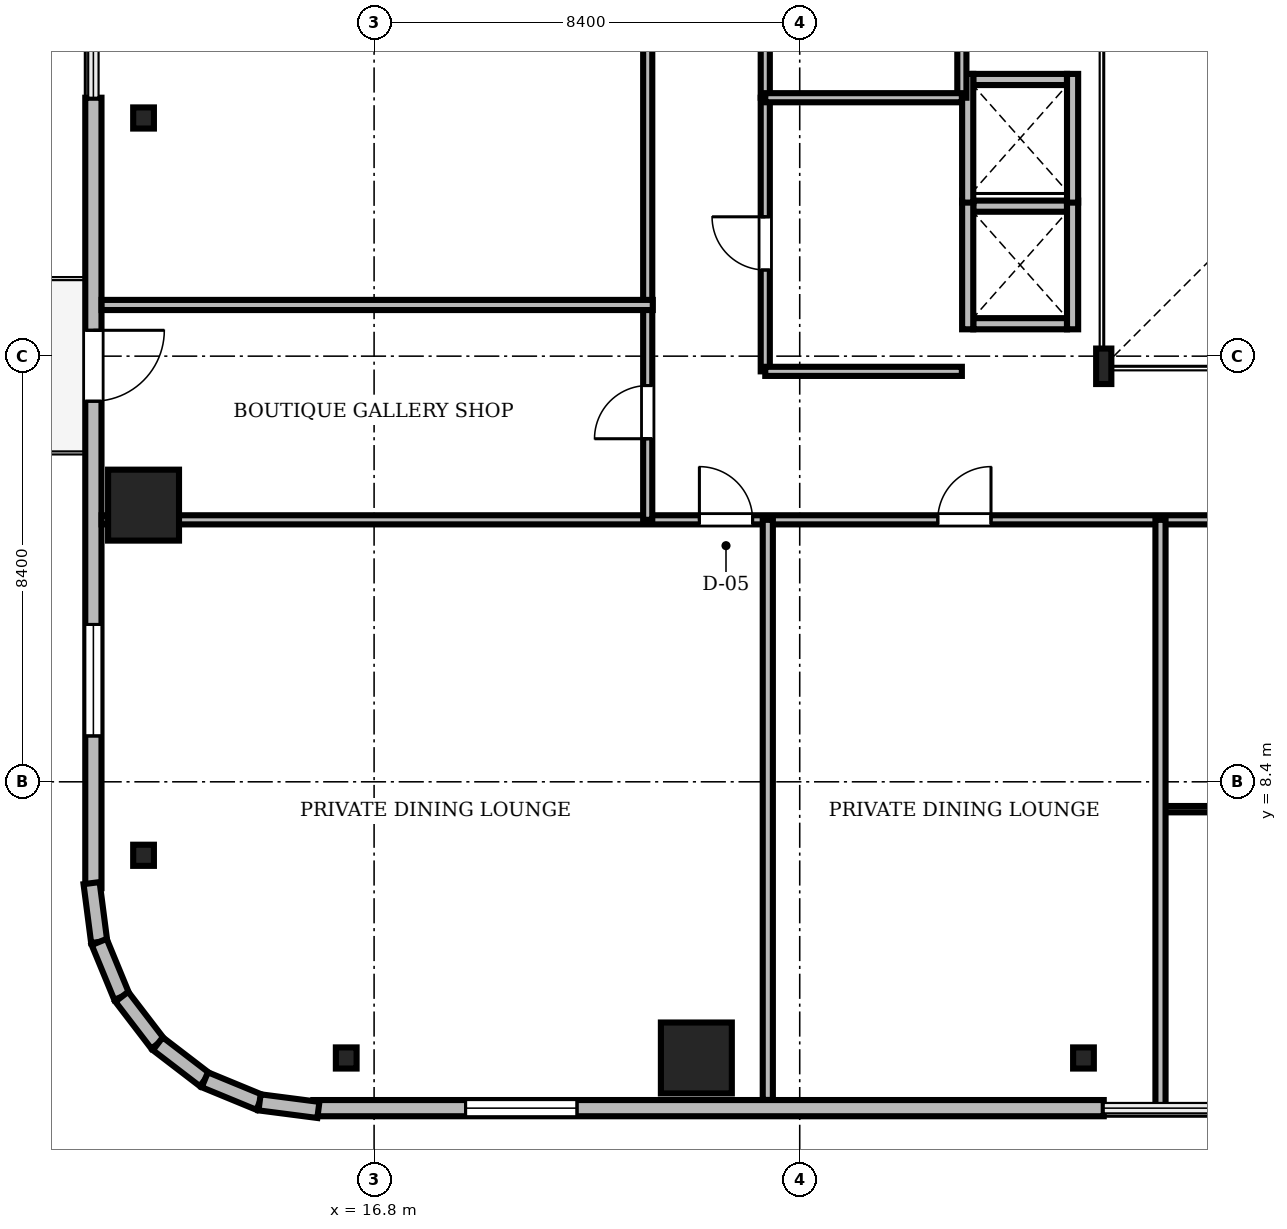
"""IFC4 building model, lengths in metres.
Left out: names, types, materials, properties, quantities, classifications, styles, units other than length and angle.
Written with IfcOpenShell. Run it as: python <this file> out.ifc"""

import sys

from ifc_helpers import new_model, si_unit, direction, frame, frame_2d, origin, origin_2d, place, context, subcontext, project, spatial, rectangle, i_section, extrude, source, transform, mapped, element, fill, save


model = new_model("IFC4")
c1 = context("Model", 3, precision=1e-05, world=origin(), true_north=direction((0.0, 1.0)))
c2 = subcontext(c1, "Body", "Model", "MODEL_VIEW")
j1 = project(units=[si_unit("LENGTHUNIT", "METRE"), si_unit("PLANEANGLEUNIT", "RADIAN")], contexts=[c1])
p1 = place(None, origin())
s1 = spatial("IfcSite", under=j1, at=p1, CompositionType="ELEMENT")
p2 = place(p1, origin())
s2 = spatial("IfcBuilding", under=s1, at=p2, CompositionType="ELEMENT")
p3 = place(p2, frame((0.0, 0.0, 192.3)))
s3 = spatial("IfcBuildingStorey", under=s2, at=p3, CompositionType="ELEMENT", Elevation=192.3)
m1 = source(origin(), c2, "Body", "SweptSolid", [
    extrude(i_section(OverallWidth=0.3, OverallDepth=0.7, WebThickness=0.017, FlangeThickness=0.032, FilletRadius=0.027, at=origin_2d()), origin(), (0.0, 0.0, 1.0), 3.53),
])
p4 = place(p3, frame((31.2, 16.6, 0.0), z_axis=(0.0, 0.0, 1.0), x_axis=(1.0, 0.0, 0.0)))
e1 = element("IfcColumn", 1, at=p4, inside=s3, PredefinedType="COLUMN", context=c2, shape_type="MappedRepresentation", body=[
    mapped(m1, transform((0.0, 0.0, 0.0), scale=1.0)),
])
m2 = source(origin(), c2, "Body", "SweptSolid", [
    extrude(rectangle(XDim=1.4, YDim=1.4, at=origin_2d()), origin(), (0.0, 0.0, 1.0), 3.53),
])
for number, where, z_axis, x_axis in (
    (2, (23.16, 2.95, 0.0), (0.0, 0.0, 1.0), (1.0, 0.0, 0.0)),
    (3, (12.25, 13.86, 0.0), (0.0, 0.0, 1.0), (1.0, 0.0, 0.0)),
):
    element("IfcColumn", number, at=place(p3, frame(where, z_axis=z_axis, x_axis=x_axis)), inside=s3, PredefinedType="COLUMN", context=c2, shape_type="MappedRepresentation", body=[
        mapped(m2, transform((0.0, 0.0, 0.0), scale=1.0)),
    ])
m3 = source(origin(), c2, "Body", "SweptSolid", [
    extrude(i_section(OverallWidth=0.409, OverallDepth=0.417, WebThickness=0.021, FlangeThickness=0.033, FilletRadius=0.015, at=origin_2d()), origin(), (0.0, 0.0, 1.0), 3.53),
])
for number, where, z_axis, x_axis in (
    (4, (16.25, 2.95, 0.0), (0.0, 0.0, 1.0), (1.0, 0.0, 0.0)),
    (5, (30.8, 2.95, 0.0), (0.0, 0.0, 1.0), (1.0, 0.0, 0.0)),
    (6, (12.25, 21.5, 0.0), (0.0, 0.0, 1.0), (1.0, 0.0, 0.0)),
    (7, (12.25, 6.95, 0.0), (0.0, 0.0, 1.0), (1.0, 0.0, 0.0)),
):
    element("IfcColumn", number, at=place(p3, frame(where, z_axis=z_axis, x_axis=x_axis)), inside=s3, PredefinedType="COLUMN", context=c2, shape_type="MappedRepresentation", body=[
        mapped(m3, transform((0.0, 0.0, 0.0), scale=1.0)),
    ])
m4 = source(origin(), c2, "Body", "SweptSolid", [
    extrude(rectangle(XDim=15.6, YDim=0.32, at=frame_2d((7.8, 0.0))), origin(), (0.0, 0.0, 1.0), 3.53),
])
p5 = place(p3, frame((15.6, 1.96, 0.0), z_axis=(0.0, 0.0, 1.0), x_axis=(1.0, 0.0, 0.0)))
e8 = element("IfcWall", 8, at=p5, inside=s3, PredefinedType="SOLIDWALL", context=c2, shape_type="MappedRepresentation", body=[
    mapped(m4, transform((0.0, 0.0, 0.0), scale=1.0)),
])
m5 = source(origin(), c2, "Body", "SweptSolid", [
    extrude(rectangle(XDim=2.2, YDim=2.4, at=frame_2d((1.1, 1.2))), frame((0.0, 0.17, 0.0), z_axis=(0.0, -1.0, 0.0), x_axis=(1.0, 0.0, 0.0)), (0.0, 0.0, 1.0), 0.34),
])
p6 = place(p5, frame((3.005, 0.0, 0.72)))
e9 = element("IfcOpeningElement", 9, at=p6, cuts=e8, PredefinedType="OPENING", context=c2, shape_type="MappedRepresentation", body=[
    mapped(m5, transform((0.0, 0.0, 0.0), scale=1.0)),
])
p7 = place(p3, frame((11.26, 21.9, 0.0), z_axis=(0.0, 0.0, 1.0), x_axis=(0.0, -1.0, 0.0)))
e10 = element("IfcWall", 10, at=p7, inside=s3, PredefinedType="SOLIDWALL", context=c2, shape_type="MappedRepresentation", body=[
    mapped(m4, transform((0.0, 0.0, 0.0), scale=1.0)),
])
m6 = source(origin(), c2, "Body", "SweptSolid", [
    extrude(rectangle(XDim=1.4, YDim=2.3, at=frame_2d((0.7, 1.15))), frame((0.0, 0.17, 0.0), z_axis=(0.0, -1.0, 0.0), x_axis=(1.0, 0.0, 0.0)), (0.0, 0.0, 1.0), 0.34),
])
p8 = place(p7, frame((4.59, 0.0, 0.0)))
e11 = element("IfcOpeningElement", 11, at=p8, cuts=e10, PredefinedType="OPENING", context=c2, shape_type="MappedRepresentation", body=[
    mapped(m6, transform((0.0, 0.0, 0.0), scale=1.0)),
])
p9 = place(p7, frame((10.395, 0.0, 0.72)))
e12 = element("IfcOpeningElement", 12, at=p9, cuts=e10, PredefinedType="OPENING", context=c2, shape_type="MappedRepresentation", body=[
    mapped(m5, transform((0.0, 0.0, 0.0), scale=1.0)),
])
m7 = source(origin(), c2, "Body", "SweptSolid", [
    extrude(rectangle(XDim=1.171, YDim=0.32, at=frame_2d((0.585, 0.0))), origin(), (0.0, 0.0, 1.0), 3.53),
])
p10 = place(p3, frame((11.224, 6.401, 0.0), z_axis=(0.0, 0.0, 1.0), x_axis=(0.128269133229, -0.991739395941, 0.0)))
e13 = element("IfcWall", 13, at=p10, inside=s3, PredefinedType="SOLIDWALL", context=c2, shape_type="MappedRepresentation", body=[
    mapped(m7, transform((0.0, 0.0, 0.0), scale=1.0)),
])
m8 = source(origin(), c2, "Body", "SweptSolid", [
    extrude(rectangle(XDim=1.169, YDim=0.32, at=frame_2d((0.584, 0.0))), origin(), (0.0, 0.0, 1.0), 3.53),
])
for number, where, z_axis, x_axis in (
    (14, (11.375, 5.24, 0.0), (0.0, 0.0, 1.0), (0.381, -0.925, 0.0)),
    (15, (11.82, 4.159, 0.0), (0.0, 0.0, 1.0), (0.608, -0.794, 0.0)),
):
    element("IfcWall", number, at=place(p3, frame(where, z_axis=z_axis, x_axis=x_axis)), inside=s3, PredefinedType="SOLIDWALL", context=c2, shape_type="MappedRepresentation", body=[
        mapped(m8, transform((0.0, 0.0, 0.0), scale=1.0)),
    ])
m9 = source(origin(), c2, "Body", "SweptSolid", [
    extrude(rectangle(XDim=1.169, YDim=0.32, at=frame_2d((0.584, 0.0))), origin(), (0.0, 0.0, 1.0), 3.53),
])
p11 = place(p3, frame((12.531, 3.231, 0.0), z_axis=(0.0, 0.0, 1.0), x_axis=(0.793663520347, -0.608356981114, 0.0)))
e16 = element("IfcWall", 16, at=p11, inside=s3, PredefinedType="SOLIDWALL", context=c2, shape_type="MappedRepresentation", body=[
    mapped(m9, transform((0.0, 0.0, 0.0), scale=1.0)),
])
m10 = source(origin(), c2, "Body", "SweptSolid", [
    extrude(rectangle(XDim=1.169, YDim=0.32, at=frame_2d((0.585, 0.0))), origin(), (0.0, 0.0, 1.0), 3.53),
])
p12 = place(p3, frame((13.459, 2.52, 0.0), z_axis=(0.0, 0.0, 1.0), x_axis=(0.924479075121, -0.381232789334, 0.0)))
e17 = element("IfcWall", 17, at=p12, inside=s3, PredefinedType="SOLIDWALL", context=c2, shape_type="MappedRepresentation", body=[
    mapped(m10, transform((0.0, 0.0, 0.0), scale=1.0)),
])
m11 = source(origin(), c2, "Body", "SweptSolid", [
    extrude(rectangle(XDim=1.17, YDim=0.32, at=frame_2d((0.585, 0.0))), origin(), (0.0, 0.0, 1.0), 3.53),
])
p13 = place(p3, frame((14.54, 2.074, 0.0), z_axis=(0.0, 0.0, 1.0), x_axis=(0.991762485493, -0.128090485085, 0.0)))
e18 = element("IfcWall", 18, at=p13, inside=s3, PredefinedType="SOLIDWALL", context=c2, shape_type="MappedRepresentation", body=[
    mapped(m11, transform((0.0, 0.0, 0.0), scale=1.0)),
])
m12 = source(origin(), c2, "Body", "SweptSolid", [
    extrude(rectangle(XDim=1.85, YDim=0.22, at=frame_2d((0.925, 0.0))), origin(), (0.0, 0.0, 1.0), 2.972),
])
p14 = place(p3, frame((28.625, 17.44, 0.0), z_axis=(0.0, 0.0, 1.0), x_axis=(1.0, 0.0, 0.0)))
e19 = element("IfcWall", 19, at=p14, inside=s3, PredefinedType="SOLIDWALL", context=c2, shape_type="MappedRepresentation", body=[
    mapped(m12, transform((0.0, 0.0, 0.0), scale=1.0)),
])
m13 = source(origin(), c2, "Body", "SweptSolid", [
    extrude(rectangle(XDim=1.85, YDim=0.22, at=frame_2d((0.925, 0.0))), origin(), (0.0, 0.0, 1.0), 3.53),
])
p15 = place(p3, frame((28.625, 19.76, 0.0), z_axis=(0.0, 0.0, 1.0), x_axis=(1.0, 0.0, 0.0)))
e20 = element("IfcWall", 20, at=p15, inside=s3, PredefinedType="SOLIDWALL", context=c2, shape_type="MappedRepresentation", body=[
    mapped(m13, transform((0.0, 0.0, 0.0), scale=1.0)),
])
m14 = source(origin(), c2, "Body", "SweptSolid", [
    extrude(rectangle(XDim=2.54, YDim=0.22, at=frame_2d((1.27, 0.0))), origin(), (0.0, 0.0, 1.0), 2.972),
])
p16 = place(p3, frame((28.515, 17.33, 0.0), z_axis=(0.0, 0.0, 1.0), x_axis=(0.0, 1.0, 0.0)))
e21 = element("IfcWall", 21, at=p16, inside=s3, PredefinedType="SOLIDWALL", context=c2, shape_type="MappedRepresentation", body=[
    mapped(m14, transform((0.0, 0.0, 0.0), scale=1.0)),
])
m15 = source(origin(), c2, "Body", "SweptSolid", [
    extrude(rectangle(XDim=2.54, YDim=0.22, at=frame_2d((1.27, 0.0))), origin(), (0.0, 0.0, 1.0), 3.53),
])
p17 = place(p3, frame((30.585, 17.33, 0.0), z_axis=(0.0, 0.0, 1.0), x_axis=(0.0, 1.0, 0.0)))
e22 = element("IfcWall", 22, at=p17, inside=s3, PredefinedType="SOLIDWALL", context=c2, shape_type="MappedRepresentation", body=[
    mapped(m15, transform((0.0, 0.0, 0.0), scale=1.0)),
])
p18 = place(p3, frame((28.625, 22.26, 0.0), z_axis=(0.0, 0.0, 1.0), x_axis=(1.0, 0.0, 0.0)))
e23 = element("IfcWall", 23, at=p18, inside=s3, PredefinedType="SOLIDWALL", context=c2, shape_type="MappedRepresentation", body=[
    mapped(m13, transform((0.0, 0.0, 0.0), scale=1.0)),
])
for number, where, z_axis, x_axis in (
    (24, (28.515, 19.83, 0.0), (0.0, 0.0, 1.0), (0.0, 1.0, 0.0)),
    (25, (30.585, 19.83, 0.0), (0.0, 0.0, 1.0), (0.0, 1.0, 0.0)),
):
    element("IfcWall", number, at=place(p3, frame(where, z_axis=z_axis, x_axis=x_axis)), inside=s3, PredefinedType="SOLIDWALL", context=c2, shape_type="MappedRepresentation", body=[
        mapped(m15, transform((0.0, 0.0, 0.0), scale=1.0)),
    ])
m16 = source(origin(), c2, "Body", "SweptSolid", [
    extrude(rectangle(XDim=46.156, YDim=0.18, at=frame_2d((23.078, 0.0))), origin(), (0.0, 0.0, 1.0), 2.772),
])
p19 = place(p3, frame((11.422, 13.57, 0.0), z_axis=(0.0, 0.0, 1.0), x_axis=(1.0, 0.0, 0.0)))
e26 = element("IfcWall", 26, at=p19, inside=s3, PredefinedType="PARTITIONING", context=c2, shape_type="MappedRepresentation", body=[
    mapped(m16, transform((0.0, 0.0, 0.0), scale=1.0)),
])
m17 = source(origin(), c2, "Body", "SweptSolid", [
    extrude(rectangle(XDim=1.05, YDim=2.2, at=frame_2d((0.525, 1.1))), frame((0.0, 0.1, 0.0), z_axis=(0.0, -1.0, 0.0), x_axis=(1.0, 0.0, 0.0)), (0.0, 0.0, 1.0), 0.2),
])
p20 = place(p19, frame((11.798, 0.0, 0.0)))
e27 = element("IfcOpeningElement", 27, at=p20, cuts=e26, PredefinedType="OPENING", context=c2, shape_type="MappedRepresentation", body=[
    mapped(m17, transform((0.0, 0.0, 0.0), scale=1.0)),
])
p21 = place(p19, frame((16.503, 0.0, 0.0)))
e28 = element("IfcOpeningElement", 28, at=p21, cuts=e26, PredefinedType="OPENING", context=c2, shape_type="MappedRepresentation", body=[
    mapped(m17, transform((0.0, 0.0, 0.0), scale=1.0)),
])
p22 = place(p19, frame((24.253, 0.0, 0.0)))
e29 = element("IfcOpeningElement", 29, at=p22, cuts=e26, PredefinedType="OPENING", context=c2, shape_type="MappedRepresentation", body=[
    mapped(m17, transform((0.0, 0.0, 0.0), scale=1.0)),
])
p23 = place(p19, frame((32.003, 0.0, 0.0)))
e30 = element("IfcOpeningElement", 30, at=p23, cuts=e26, PredefinedType="OPENING", context=c2, shape_type="MappedRepresentation", body=[
    mapped(m17, transform((0.0, 0.0, 0.0), scale=1.0)),
])
p24 = place(p19, frame((37.498, 0.0, 0.0)))
e31 = element("IfcOpeningElement", 31, at=p24, cuts=e26, PredefinedType="OPENING", context=c2, shape_type="MappedRepresentation", body=[
    mapped(m17, transform((0.0, 0.0, 0.0), scale=1.0)),
])
m18 = source(origin(), c2, "Body", "SweptSolid", [
    extrude(rectangle(XDim=14.98, YDim=0.18, at=frame_2d((7.49, 0.0))), origin(), (0.0, 0.0, 1.0), 2.972),
])
p25 = place(p3, frame((22.2, 13.57, 0.0), z_axis=(0.0, 0.0, 1.0), x_axis=(0.0, 1.0, 0.0)))
e32 = element("IfcWall", 32, at=p25, inside=s3, PredefinedType="PARTITIONING", context=c2, shape_type="MappedRepresentation", body=[
    mapped(m18, transform((0.0, 0.0, 0.0), scale=1.0)),
])
p26 = place(p25, frame((1.6, 0.0, 0.0)))
e33 = element("IfcOpeningElement", 33, at=p26, cuts=e32, PredefinedType="OPENING", context=c2, shape_type="MappedRepresentation", body=[
    mapped(m17, transform((0.0, 0.0, 0.0), scale=1.0)),
])
m19 = source(origin(), c2, "Body", "SweptSolid", [
    extrude(rectangle(XDim=7.75, YDim=0.125, at=frame_2d((3.875, 0.0))), origin(), (0.0, 0.0, 1.0), 2.972),
])
p27 = place(p3, frame((32.32, 7.86, 0.0), z_axis=(0.0, 0.0, 1.0), x_axis=(1.0, 0.0, 0.0)))
e34 = element("IfcWall", 34, at=p27, inside=s3, PredefinedType="PARTITIONING", context=c2, shape_type="MappedRepresentation", body=[
    mapped(m19, transform((0.0, 0.0, 0.0), scale=1.0)),
])
m20 = source(origin(), c2, "Body", "SweptSolid", [
    extrude(rectangle(XDim=0.95, YDim=2.15, at=frame_2d((0.475, 1.075))), frame((0.0, 0.073, 0.0), z_axis=(0.0, -1.0, 0.0), x_axis=(1.0, 0.0, 0.0)), (0.0, 0.0, 1.0), 0.145),
])
p28 = place(p27, frame((3.395, 0.0, 0.0)))
e35 = element("IfcOpeningElement", 35, at=p28, cuts=e34, PredefinedType="OPENING", context=c2, shape_type="MappedRepresentation", body=[
    mapped(m20, transform((0.0, 0.0, 0.0), scale=1.0)),
])
m21 = source(origin(), c2, "Body", "SweptSolid", [
    extrude(rectangle(XDim=6.54, YDim=0.18, at=frame_2d((3.27, 0.0))), origin(), (0.0, 0.0, 1.0), 2.972),
])
p29 = place(p3, frame((24.52, 21.9, 0.0), z_axis=(0.0, 0.0, 1.0), x_axis=(0.0, 1.0, 0.0)))
e36 = element("IfcWall", 36, at=p29, inside=s3, PredefinedType="PARTITIONING", context=c2, shape_type="MappedRepresentation", body=[
    mapped(m21, transform((0.0, 0.0, 0.0), scale=1.0)),
])
p30 = place(p29, frame((2.2, 0.0, 0.0)))
e37 = element("IfcOpeningElement", 37, at=p30, cuts=e36, PredefinedType="OPENING", context=c2, shape_type="MappedRepresentation", body=[
    mapped(m17, transform((0.0, 0.0, 0.0), scale=1.0)),
])
m22 = source(origin(), c2, "Body", "SweptSolid", [
    extrude(rectangle(XDim=5.4, YDim=0.18, at=frame_2d((2.7, 0.0))), origin(), (0.0, 0.0, 1.0), 2.972),
])
p31 = place(p3, frame((24.52, 16.5, 0.0), z_axis=(0.0, 0.0, 1.0), x_axis=(0.0, 1.0, 0.0)))
e38 = element("IfcWall", 38, at=p31, inside=s3, PredefinedType="PARTITIONING", context=c2, shape_type="MappedRepresentation", body=[
    mapped(m22, transform((0.0, 0.0, 0.0), scale=1.0)),
])
p32 = place(p31, frame((2.0, 0.0, 0.0)))
e39 = element("IfcOpeningElement", 39, at=p32, cuts=e38, PredefinedType="OPENING", context=c2, shape_type="MappedRepresentation", body=[
    mapped(m17, transform((0.0, 0.0, 0.0), scale=1.0)),
])
m23 = source(origin(), c2, "Body", "SweptSolid", [
    extrude(rectangle(XDim=11.448, YDim=0.2, at=frame_2d((5.724, 0.0))), origin(), (0.0, 0.0, 1.0), 2.772),
])
p33 = place(p3, frame((24.57, 2.122, 0.0), z_axis=(0.0, 0.0, 1.0), x_axis=(0.0, 1.0, 0.0)))
e40 = element("IfcWall", 40, at=p33, inside=s3, PredefinedType="PARTITIONING", context=c2, shape_type="MappedRepresentation", body=[
    mapped(m23, transform((0.0, 0.0, 0.0), scale=1.0)),
])
m24 = source(origin(), c2, "Body", "SweptSolid", [
    extrude(rectangle(XDim=11.64, YDim=0.2, at=frame_2d((5.82, 0.0))), origin(), (0.0, 0.0, 1.0), 2.772),
])
p34 = place(p3, frame((32.32, 1.93, 0.0), z_axis=(0.0, 0.0, 1.0), x_axis=(0.0, 1.0, 0.0)))
e41 = element("IfcWall", 41, at=p34, inside=s3, PredefinedType="PARTITIONING", context=c2, shape_type="MappedRepresentation", body=[
    mapped(m24, transform((0.0, 0.0, 0.0), scale=1.0)),
])
m25 = source(origin(), c2, "Body", "SweptSolid", [
    extrude(rectangle(XDim=10.878, YDim=0.2, at=frame_2d((5.439, 0.0))), origin(), (0.0, 0.0, 1.0), 2.772),
])
p35 = place(p3, frame((11.422, 17.81, 0.0), z_axis=(0.0, 0.0, 1.0), x_axis=(1.0, 0.0, 0.0)))
e42 = element("IfcWall", 42, at=p35, inside=s3, PredefinedType="PARTITIONING", context=c2, shape_type="MappedRepresentation", body=[
    mapped(m25, transform((0.0, 0.0, 0.0), scale=1.0)),
])
p36 = place(p3, frame((28.4, 21.9, 0.0), z_axis=(0.0, 0.0, 1.0), x_axis=(0.0, 1.0, 0.0)))
e43 = element("IfcWall", 43, at=p36, inside=s3, PredefinedType="PARTITIONING", context=c2, shape_type="MappedRepresentation", body=[
    mapped(m21, transform((0.0, 0.0, 0.0), scale=1.0)),
])
m26 = source(origin(), c2, "Body", "SweptSolid", [
    extrude(rectangle(XDim=3.88, YDim=0.18, at=frame_2d((1.94, 0.0))), origin(), (0.0, 0.0, 1.0), 3.53),
])
for number, where, z_axis, x_axis in (
    (44, (24.52, 16.5, 0.0), (0.0, 0.0, 1.0), (1.0, 0.0, 0.0)),
    (45, (24.52, 21.9, 0.0), (0.0, 0.0, 1.0), (1.0, 0.0, 0.0)),
):
    element("IfcWall", number, at=place(p3, frame(where, z_axis=z_axis, x_axis=x_axis)), inside=s3, PredefinedType="PARTITIONING", context=c2, shape_type="MappedRepresentation", body=[
        mapped(m26, transform((0.0, 0.0, 0.0), scale=1.0)),
    ])
m27 = source(origin(), c2, "Body", "SweptSolid", [
    extrude(rectangle(XDim=2.2, YDim=2.4, at=frame_2d((1.1, 1.2))), frame((0.0, 0.03, 0.0), z_axis=(0.0, -1.0, 0.0), x_axis=(1.0, 0.0, 0.0)), (0.0, 0.0, 1.0), 0.06),
])
p37 = place(p6, origin())
e46 = element("IfcWindow", 46, at=p37, inside=s3, PartitioningType="SINGLE_PANEL", PredefinedType="WINDOW", context=c2, shape_type="MappedRepresentation", body=[
    mapped(m27, transform((0.0, 0.0, 0.0), scale=1.0)),
])
fill(e9, e46)
m28 = source(origin(), c2, "Body", "SweptSolid", [
    extrude(rectangle(XDim=1.4, YDim=2.3, at=frame_2d((0.7, 1.15))), frame((0.0, 0.025, 0.0), z_axis=(0.0, -1.0, 0.0), x_axis=(1.0, 0.0, 0.0)), (0.0, 0.0, 1.0), 0.05),
])
p38 = place(p8, frame((1.4, 0.0, 0.0), z_axis=(0.0, 0.0, 1.0), x_axis=(-1.0, 0.0, 0.0)))
e47 = element("IfcDoor", 47, at=p38, inside=s3, OperationType="DOUBLE_DOOR_SLIDING", PredefinedType="DOOR", context=c2, shape_type="MappedRepresentation", body=[
    mapped(m28, transform((0.0, 0.0, 0.0), scale=1.0)),
])
fill(e11, e47)
p39 = place(p9, origin())
e48 = element("IfcWindow", 48, at=p39, inside=s3, PartitioningType="SINGLE_PANEL", PredefinedType="WINDOW", context=c2, shape_type="MappedRepresentation", body=[
    mapped(m27, transform((0.0, 0.0, 0.0), scale=1.0)),
])
fill(e12, e48)
m29 = source(origin(), c2, "Body", "SweptSolid", [
    extrude(rectangle(XDim=1.05, YDim=2.2, at=frame_2d((0.525, 1.1))), frame((0.0, 0.025, 0.0), z_axis=(0.0, -1.0, 0.0), x_axis=(1.0, 0.0, 0.0)), (0.0, 0.0, 1.0), 0.05),
])
p40 = place(p20, origin())
e49 = element("IfcDoor", 49, at=p40, inside=s3, OperationType="SINGLE_SWING_LEFT", PredefinedType="DOOR", context=c2, shape_type="MappedRepresentation", body=[
    mapped(m29, transform((0.0, 0.0, 0.0), scale=1.0)),
])
fill(e27, e49)
p41 = place(p21, origin())
e50 = element("IfcDoor", 50, at=p41, inside=s3, OperationType="SINGLE_SWING_RIGHT", PredefinedType="DOOR", context=c2, shape_type="MappedRepresentation", body=[
    mapped(m29, transform((0.0, 0.0, 0.0), scale=1.0)),
])
fill(e28, e50)
p42 = place(p26, origin())
e51 = element("IfcDoor", 51, at=p42, inside=s3, OperationType="SINGLE_SWING_LEFT", PredefinedType="DOOR", context=c2, shape_type="MappedRepresentation", body=[
    mapped(m29, transform((0.0, 0.0, 0.0), scale=1.0)),
])
fill(e33, e51)
p43 = place(p32, origin())
e52 = element("IfcDoor", 52, at=p43, inside=s3, OperationType="SINGLE_SWING_RIGHT", PredefinedType="DOOR", context=c2, shape_type="MappedRepresentation", body=[
    mapped(m29, transform((0.0, 0.0, 0.0), scale=1.0)),
])
fill(e39, e52)
save(model, sys.argv[1])
